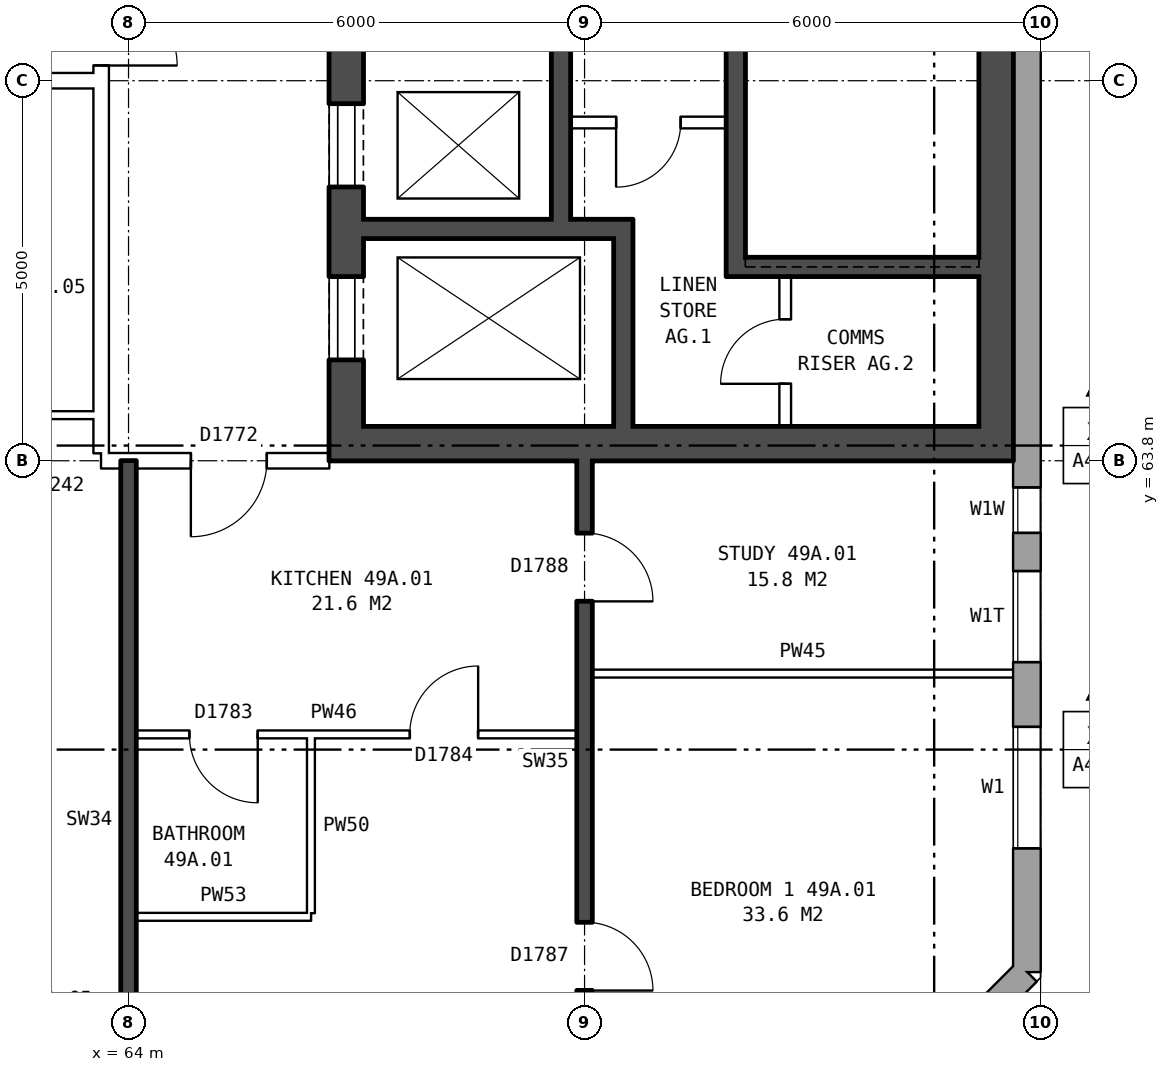
"""IFC4 building model, lengths in metres.
Left out: names, types, materials, properties, quantities, classifications, styles, units other than length and angle.
Written with IfcOpenShell. Run it as: python <this file> out.ifc"""

import sys

from ifc_helpers import new_model, si_unit, direction, frame, frame_2d, origin, place, context, subcontext, project, spatial, rectangle, extrude, element, fill, save


model = new_model("IFC4")
c1 = context("Model", 3, precision=1e-05, world=origin(), true_north=direction((0.0, 1.0)))
c2 = subcontext(c1, "Body", "Model", "MODEL_VIEW")
j1 = project(units=[si_unit("LENGTHUNIT", "METRE"), si_unit("PLANEANGLEUNIT", "RADIAN")], contexts=[c1])
p1 = place(None, origin())
s1 = spatial("IfcSite", under=j1, at=p1, CompositionType="ELEMENT")
p2 = place(p1, origin())
s2 = spatial("IfcBuilding", under=s1, at=p2, CompositionType="ELEMENT")
p3 = place(p2, frame((0.0, 0.0, 175.8)))
s3 = spatial("IfcBuildingStorey", under=s2, at=p3, CompositionType="ELEMENT", Elevation=175.8)
p4 = place(p3, frame((72.925, 54.18, 0.0), z_axis=(0.0, 0.0, 1.0), x_axis=(0.707106781187, 0.707106781187, 0.0)))
e1 = element("IfcWall", 1, at=p4, inside=s3, PredefinedType="STANDARD", context=c2, shape_type="SweptSolid", body=[
    extrude(rectangle(XDim=4.094, YDim=0.36, at=frame_2d((2.047, 0.0))), origin(), (0.0, 0.0, 1.0), 2.85),
])
p5 = place(p4, frame((1.247, 0.0, 0.8)))
e2 = element("IfcOpeningElement", 2, at=p5, cuts=e1, PredefinedType="OPENING", context=c2, shape_type="SweptSolid", body=[
    extrude(rectangle(XDim=1.6, YDim=1.8, at=frame_2d((0.8, 0.9))), frame((0.0, 0.19, 0.0), z_axis=(0.0, -1.0, 0.0), x_axis=(1.0, 0.0, 0.0)), (0.0, 0.0, 1.0), 0.38),
])
p6 = place(p3, frame((75.82, 57.075, 0.0), z_axis=(0.0, 0.0, 1.0), x_axis=(0.0, 1.0, 0.0)))
e3 = element("IfcWall", 3, at=p6, inside=s3, PredefinedType="STANDARD", context=c2, shape_type="SweptSolid", body=[
    extrude(rectangle(XDim=25.851, YDim=0.36, at=frame_2d((12.925, 0.0))), origin(), (0.0, 0.0, 1.0), 2.85),
])
p7 = place(p6, frame((1.625, 0.0, 0.8)))
e4 = element("IfcOpeningElement", 4, at=p7, cuts=e3, PredefinedType="OPENING", context=c2, shape_type="SweptSolid", body=[
    extrude(rectangle(XDim=1.6, YDim=1.8, at=frame_2d((0.8, 0.9))), frame((0.0, 0.19, 0.0), z_axis=(0.0, -1.0, 0.0), x_axis=(1.0, 0.0, 0.0)), (0.0, 0.0, 1.0), 0.38),
])
p8 = place(p6, frame((4.075, 0.0, 1.65)))
e5 = element("IfcOpeningElement", 5, at=p8, cuts=e3, PredefinedType="OPENING", context=c2, shape_type="SweptSolid", body=[
    extrude(rectangle(XDim=1.2, YDim=0.9, at=frame_2d((0.6, 0.45))), frame((0.0, 0.19, 0.0), z_axis=(0.0, -1.0, 0.0), x_axis=(1.0, 0.0, 0.0)), (0.0, 0.0, 1.0), 0.38),
])
p9 = place(p6, frame((19.45, 0.0, 0.35)))
e6 = element("IfcOpeningElement", 6, at=p9, cuts=e3, PredefinedType="OPENING", context=c2, shape_type="SweptSolid", body=[
    extrude(rectangle(XDim=0.8, YDim=0.9, at=frame_2d((0.4, 0.45))), frame((0.0, 0.19, 0.0), z_axis=(0.0, -1.0, 0.0), x_axis=(1.0, 0.0, 0.0)), (0.0, 0.0, 1.0), 0.38),
])
p10 = place(p6, frame((22.625, 0.0, 0.8)))
e7 = element("IfcOpeningElement", 7, at=p10, cuts=e3, PredefinedType="OPENING", context=c2, shape_type="SweptSolid", body=[
    extrude(rectangle(XDim=1.6, YDim=1.8, at=frame_2d((0.8, 0.9))), frame((0.0, 0.19, 0.0), z_axis=(0.0, -1.0, 0.0), x_axis=(1.0, 0.0, 0.0)), (0.0, 0.0, 1.0), 0.38),
])
p11 = place(p6, frame((5.775, 0.0, 0.45)))
e8 = element("IfcOpeningElement", 8, at=p11, cuts=e3, PredefinedType="OPENING", context=c2, shape_type="SweptSolid", body=[
    extrude(rectangle(XDim=0.6, YDim=0.9, at=frame_2d((0.3, 0.45))), frame((0.0, 0.19, 0.0), z_axis=(0.0, -1.0, 0.0), x_axis=(1.0, 0.0, 0.0)), (0.0, 0.0, 1.0), 0.38),
])
p12 = place(p6, frame((20.6, 0.0, 1.65)))
e9 = element("IfcOpeningElement", 9, at=p12, cuts=e3, PredefinedType="OPENING", context=c2, shape_type="SweptSolid", body=[
    extrude(rectangle(XDim=1.0, YDim=0.9, at=frame_2d((0.5, 0.45))), frame((0.0, 0.19, 0.0), z_axis=(0.0, -1.0, 0.0), x_axis=(1.0, 0.0, 0.0)), (0.0, 0.0, 1.0), 0.38),
])
p13 = place(p3, frame((66.865, 63.8, 0.0), z_axis=(0.0, 0.0, 1.0), x_axis=(0.0, 1.0, 0.0)))
e10 = element("IfcWall", 10, at=p13, inside=s3, PredefinedType="SHEAR", context=c2, shape_type="SweptSolid", body=[
    extrude(rectangle(XDim=12.4, YDim=0.45, at=frame_2d((6.2, 0.0))), origin(), (0.0, 0.0, 1.0), 2.85),
])
p14 = place(p13, frame((1.325, 0.0, 0.0)))
e11 = element("IfcOpeningElement", 11, at=p14, cuts=e10, PredefinedType="OPENING", context=c2, shape_type="SweptSolid", body=[
    extrude(rectangle(XDim=1.1, YDim=2.1, at=frame_2d((0.55, 1.05))), frame((0.0, 0.235, 0.0), z_axis=(0.0, -1.0, 0.0), x_axis=(1.0, 0.0, 0.0)), (0.0, 0.0, 1.0), 0.47),
])
p15 = place(p13, frame((3.6, 0.0, 0.0)))
e12 = element("IfcOpeningElement", 12, at=p15, cuts=e10, PredefinedType="OPENING", context=c2, shape_type="SweptSolid", body=[
    extrude(rectangle(XDim=1.1, YDim=2.1, at=frame_2d((0.55, 1.05))), frame((0.0, 0.235, 0.0), z_axis=(0.0, -1.0, 0.0), x_axis=(1.0, 0.0, 0.0)), (0.0, 0.0, 1.0), 0.47),
])
p16 = place(p13, frame((5.8, 0.0, 0.0)))
e13 = element("IfcOpeningElement", 13, at=p16, cuts=e10, PredefinedType="OPENING", context=c2, shape_type="SweptSolid", body=[
    extrude(rectangle(XDim=1.1, YDim=2.1, at=frame_2d((0.55, 1.05))), frame((0.0, 0.235, 0.0), z_axis=(0.0, -1.0, 0.0), x_axis=(1.0, 0.0, 0.0)), (0.0, 0.0, 1.0), 0.47),
])
p17 = place(p13, frame((8.0, 0.0, 0.0)))
e14 = element("IfcOpeningElement", 14, at=p17, cuts=e10, PredefinedType="OPENING", context=c2, shape_type="SweptSolid", body=[
    extrude(rectangle(XDim=1.1, YDim=2.1, at=frame_2d((0.55, 1.05))), frame((0.0, 0.235, 0.0), z_axis=(0.0, -1.0, 0.0), x_axis=(1.0, 0.0, 0.0)), (0.0, 0.0, 1.0), 0.47),
])
p18 = place(p13, frame((9.9, 0.0, 0.0)))
e15 = element("IfcOpeningElement", 15, at=p18, cuts=e10, PredefinedType="OPENING", context=c2, shape_type="SweptSolid", body=[
    extrude(rectangle(XDim=1.1, YDim=2.1, at=frame_2d((0.55, 1.05))), frame((0.0, 0.235, 0.0), z_axis=(0.0, -1.0, 0.0), x_axis=(1.0, 0.0, 0.0)), (0.0, 0.0, 1.0), 0.47),
])
p19 = place(p3, frame((75.415, 63.8, 0.0), z_axis=(0.0, 0.0, 1.0), x_axis=(0.0, 1.0, 0.0)))
e16 = element("IfcWall", 16, at=p19, inside=s3, PredefinedType="SHEAR", context=c2, shape_type="SweptSolid", body=[
    extrude(rectangle(XDim=12.4, YDim=0.45, at=frame_2d((6.2, 0.0))), origin(), (0.0, 0.0, 1.0), 2.85),
])
p20 = place(p3, frame((67.09, 64.025, 0.0), z_axis=(0.0, 0.0, 1.0), x_axis=(1.0, 0.0, 0.0)))
e17 = element("IfcWall", 17, at=p20, inside=s3, PredefinedType="SHEAR", context=c2, shape_type="SweptSolid", body=[
    extrude(rectangle(XDim=8.1, YDim=0.45, at=frame_2d((4.05, 0.0))), origin(), (0.0, 0.0, 1.0), 2.85),
])
p21 = place(p3, frame((72.115, 66.35, 0.0), z_axis=(0.0, 0.0, 1.0), x_axis=(1.0, 0.0, 0.0)))
e18 = element("IfcWall", 18, at=p21, inside=s3, PredefinedType="SHEAR", context=c2, shape_type="SweptSolid", body=[
    extrude(rectangle(XDim=3.075, YDim=0.25, at=frame_2d((1.538, 0.0))), origin(), (0.0, 0.0, 1.0), 2.85),
])
p22 = place(p3, frame((67.09, 66.85, 0.0), z_axis=(0.0, 0.0, 1.0), x_axis=(1.0, 0.0, 0.0)))
e19 = element("IfcWall", 19, at=p22, inside=s3, PredefinedType="SHEAR", context=c2, shape_type="SweptSolid", body=[
    extrude(rectangle(XDim=3.545, YDim=0.25, at=frame_2d((1.772, 0.0))), origin(), (0.0, 0.0, 1.0), 2.85),
])
p23 = place(p3, frame((69.815, 68.25, 0.0), z_axis=(0.0, 0.0, 1.0), x_axis=(1.0, 0.0, 0.0)))
e20 = element("IfcWall", 20, at=p23, inside=s3, PredefinedType="PARTITIONING", context=c2, shape_type="SweptSolid", body=[
    extrude(rectangle(XDim=2.05, YDim=0.15, at=frame_2d((1.025, 0.0))), origin(), (0.0, 0.0, 1.0), 2.85),
])
p24 = place(p23, frame((0.6, 0.0, 0.0)))
e21 = element("IfcOpeningElement", 21, at=p24, cuts=e20, PredefinedType="OPENING", context=c2, shape_type="SweptSolid", body=[
    extrude(rectangle(XDim=0.85, YDim=2.1, at=frame_2d((0.425, 1.05))), frame((0.0, 0.085, 0.0), z_axis=(0.0, -1.0, 0.0), x_axis=(1.0, 0.0, 0.0)), (0.0, 0.0, 1.0), 0.17),
])
p25 = place(p3, frame((69.69, 66.975, 0.0), z_axis=(0.0, 0.0, 1.0), x_axis=(0.0, 1.0, 0.0)))
e22 = element("IfcWall", 22, at=p25, inside=s3, PredefinedType="SHEAR", context=c2, shape_type="SweptSolid", body=[
    extrude(rectangle(XDim=6.6, YDim=0.25, at=frame_2d((3.3, 0.0))), origin(), (0.0, 0.0, 1.0), 2.85),
])
p26 = place(p3, frame((70.51, 64.25, 0.0), z_axis=(0.0, 0.0, 1.0), x_axis=(0.0, 1.0, 0.0)))
e23 = element("IfcWall", 23, at=p26, inside=s3, PredefinedType="SHEAR", context=c2, shape_type="SweptSolid", body=[
    extrude(rectangle(XDim=2.475, YDim=0.25, at=frame_2d((1.238, 0.0))), origin(), (0.0, 0.0, 1.0), 2.85),
])
p27 = place(p3, frame((71.99, 66.225, 0.0), z_axis=(0.0, 0.0, 1.0), x_axis=(0.0, 1.0, 0.0)))
e24 = element("IfcWall", 24, at=p27, inside=s3, PredefinedType="SHEAR", context=c2, shape_type="SweptSolid", body=[
    extrude(rectangle(XDim=7.35, YDim=0.25, at=frame_2d((3.675, 0.0))), origin(), (0.0, 0.0, 1.0), 2.85),
])
p28 = place(p3, frame((72.64, 64.25, 0.0), z_axis=(0.0, 0.0, 1.0), x_axis=(0.0, 1.0, 0.0)))
e25 = element("IfcWall", 25, at=p28, inside=s3, PredefinedType="PARTITIONING", context=c2, shape_type="SweptSolid", body=[
    extrude(rectangle(XDim=1.975, YDim=0.15, at=frame_2d((0.988, 0.0))), origin(), (0.0, 0.0, 1.0), 2.85),
])
p29 = place(p28, frame((0.562, 0.0, 0.0)))
e26 = element("IfcOpeningElement", 26, at=p29, cuts=e25, PredefinedType="OPENING", context=c2, shape_type="SweptSolid", body=[
    extrude(rectangle(XDim=0.85, YDim=2.1, at=frame_2d((0.425, 1.05))), frame((0.0, 0.085, 0.0), z_axis=(0.0, -1.0, 0.0), x_axis=(1.0, 0.0, 0.0)), (0.0, 0.0, 1.0), 0.17),
])
p30 = place(p3, frame((63.64, 63.9, 0.0), z_axis=(0.0, 0.0, 1.0), x_axis=(0.0, 1.0, 0.0)))
e27 = element("IfcWall", 27, at=p30, inside=s3, PredefinedType="PARTITIONING", context=c2, shape_type="SweptSolid", body=[
    extrude(rectangle(XDim=12.2, YDim=0.2, at=frame_2d((6.1, 0.0))), origin(), (0.0, 0.0, 1.0), 2.85),
])
p31 = place(p30, frame((5.1, 0.0, 0.0)))
e28 = element("IfcOpeningElement", 28, at=p31, cuts=e27, PredefinedType="OPENING", context=c2, shape_type="SweptSolid", body=[
    extrude(rectangle(XDim=2.0, YDim=2.1, at=frame_2d((1.0, 1.05))), frame((0.0, 0.11, 0.0), z_axis=(0.0, -1.0, 0.0), x_axis=(1.0, 0.0, 0.0)), (0.0, 0.0, 1.0), 0.22),
])
p32 = place(p3, frame((64.1, 57.8, 0.0), z_axis=(0.0, 0.0, 1.0), x_axis=(1.0, 0.0, 0.0)))
e29 = element("IfcWall", 29, at=p32, inside=s3, PredefinedType="PARTITIONING", context=c2, shape_type="SweptSolid", body=[
    extrude(rectangle(XDim=2.3, YDim=0.1, at=frame_2d((1.15, 0.0))), origin(), (0.0, 0.0, 1.0), 2.85),
])
p33 = place(p3, frame((64.1, 60.2, 0.0), z_axis=(0.0, 0.0, 1.0), x_axis=(1.0, 0.0, 0.0)))
e30 = element("IfcWall", 30, at=p33, inside=s3, PredefinedType="PARTITIONING", context=c2, shape_type="SweptSolid", body=[
    extrude(rectangle(XDim=5.8, YDim=0.1, at=frame_2d((2.9, 0.0))), origin(), (0.0, 0.0, 1.0), 2.85),
])
p34 = place(p33, frame((3.6, 0.0, 0.0)))
e31 = element("IfcOpeningElement", 31, at=p34, cuts=e30, PredefinedType="OPENING", context=c2, shape_type="SweptSolid", body=[
    extrude(rectangle(XDim=0.9, YDim=2.1, at=frame_2d((0.45, 1.05))), frame((0.0, 0.06, 0.0), z_axis=(0.0, -1.0, 0.0), x_axis=(1.0, 0.0, 0.0)), (0.0, 0.0, 1.0), 0.12),
])
p35 = place(p33, frame((0.7, 0.0, 0.0)))
e32 = element("IfcOpeningElement", 32, at=p35, cuts=e30, PredefinedType="OPENING", context=c2, shape_type="SweptSolid", body=[
    extrude(rectangle(XDim=0.9, YDim=2.1, at=frame_2d((0.45, 1.05))), frame((0.0, 0.06, 0.0), z_axis=(0.0, -1.0, 0.0), x_axis=(1.0, 0.0, 0.0)), (0.0, 0.0, 1.0), 0.12),
])
p36 = place(p3, frame((70.1, 61.0, 0.0), z_axis=(0.0, 0.0, 1.0), x_axis=(1.0, 0.0, 0.0)))
e33 = element("IfcWall", 33, at=p36, inside=s3, PredefinedType="PARTITIONING", context=c2, shape_type="SweptSolid", body=[
    extrude(rectangle(XDim=5.54, YDim=0.1, at=frame_2d((2.77, 0.0))), origin(), (0.0, 0.0, 1.0), 2.85),
])
p37 = place(p3, frame((63.64, 63.8, 0.0), z_axis=(0.0, 0.0, 1.0), x_axis=(1.0, 0.0, 0.0)))
e34 = element("IfcWall", 34, at=p37, inside=s3, PredefinedType="PARTITIONING", context=c2, shape_type="SweptSolid", body=[
    extrude(rectangle(XDim=3.0, YDim=0.2, at=frame_2d((1.5, 0.0))), origin(), (0.0, 0.0, 1.0), 2.85),
])
p38 = place(p37, frame((1.18, 0.0, 0.0)))
e35 = element("IfcOpeningElement", 35, at=p38, cuts=e34, PredefinedType="OPENING", context=c2, shape_type="SweptSolid", body=[
    extrude(rectangle(XDim=1.0, YDim=2.1, at=frame_2d((0.5, 1.05))), frame((0.0, 0.11, 0.0), z_axis=(0.0, -1.0, 0.0), x_axis=(1.0, 0.0, 0.0)), (0.0, 0.0, 1.0), 0.22),
])
p39 = place(p3, frame((61.0, 64.4, 0.0), z_axis=(0.0, 0.0, 1.0), x_axis=(1.0, 0.0, 0.0)))
e36 = element("IfcWall", 36, at=p39, inside=s3, PredefinedType="PARTITIONING", context=c2, shape_type="SweptSolid", body=[
    extrude(rectangle(XDim=2.64, YDim=0.1, at=frame_2d((1.32, 0.0))), origin(), (0.0, 0.0, 1.0), 2.85),
])
p40 = place(p3, frame((44.36, 68.8, 0.0), z_axis=(0.0, 0.0, 1.0), x_axis=(1.0, 0.0, 0.0)))
e37 = element("IfcWall", 37, at=p40, inside=s3, PredefinedType="PARTITIONING", context=c2, shape_type="SweptSolid", body=[
    extrude(rectangle(XDim=19.28, YDim=0.2, at=frame_2d((9.64, 0.0))), origin(), (0.0, 0.0, 1.0), 2.85),
])
p41 = place(p40, frame((14.64, 0.0, 0.0)))
e38 = element("IfcOpeningElement", 38, at=p41, cuts=e37, PredefinedType="OPENING", context=c2, shape_type="SweptSolid", body=[
    extrude(rectangle(XDim=1.0, YDim=2.1, at=frame_2d((0.5, 1.05))), frame((0.0, 0.11, 0.0), z_axis=(0.0, -1.0, 0.0), x_axis=(1.0, 0.0, 0.0)), (0.0, 0.0, 1.0), 0.22),
])
p42 = place(p40, frame((11.64, 0.0, 0.0)))
e39 = element("IfcOpeningElement", 39, at=p42, cuts=e37, PredefinedType="OPENING", context=c2, shape_type="SweptSolid", body=[
    extrude(rectangle(XDim=1.0, YDim=2.1, at=frame_2d((0.5, 1.05))), frame((0.0, 0.11, 0.0), z_axis=(0.0, -1.0, 0.0), x_axis=(1.0, 0.0, 0.0)), (0.0, 0.0, 1.0), 0.22),
])
p43 = place(p40, frame((5.64, 0.0, 0.0)))
e40 = element("IfcOpeningElement", 40, at=p43, cuts=e37, PredefinedType="OPENING", context=c2, shape_type="SweptSolid", body=[
    extrude(rectangle(XDim=1.0, YDim=2.1, at=frame_2d((0.5, 1.05))), frame((0.0, 0.11, 0.0), z_axis=(0.0, -1.0, 0.0), x_axis=(1.0, 0.0, 0.0)), (0.0, 0.0, 1.0), 0.22),
])
p44 = place(p3, frame((64.0, 54.36, 0.0), z_axis=(0.0, 0.0, 1.0), x_axis=(0.0, 1.0, 0.0)))
e41 = element("IfcWall", 41, at=p44, inside=s3, PredefinedType="SOLIDWALL", context=c2, shape_type="SweptSolid", body=[
    extrude(rectangle(XDim=9.44, YDim=0.2, at=frame_2d((4.72, 0.0))), origin(), (0.0, 0.0, 1.0), 2.85),
])
p45 = place(p3, frame((66.4, 57.85, 0.0), z_axis=(0.0, 0.0, 1.0), x_axis=(0.0, 1.0, 0.0)))
e42 = element("IfcWall", 42, at=p45, inside=s3, PredefinedType="PARTITIONING", context=c2, shape_type="SweptSolid", body=[
    extrude(rectangle(XDim=2.3, YDim=0.1, at=frame_2d((1.15, 0.0))), origin(), (0.0, 0.0, 1.0), 2.85),
])
p46 = place(p3, frame((70.0, 54.36, 0.0), z_axis=(0.0, 0.0, 1.0), x_axis=(0.0, 1.0, 0.0)))
e43 = element("IfcWall", 43, at=p46, inside=s3, PredefinedType="SOLIDWALL", context=c2, shape_type="SweptSolid", body=[
    extrude(rectangle(XDim=9.44, YDim=0.2, at=frame_2d((4.72, 0.0))), origin(), (0.0, 0.0, 1.0), 2.85),
])
p47 = place(p46, frame((2.47, 0.0, 0.0)))
e44 = element("IfcOpeningElement", 44, at=p47, cuts=e43, PredefinedType="OPENING", context=c2, shape_type="SweptSolid", body=[
    extrude(rectangle(XDim=0.9, YDim=2.1, at=frame_2d((0.45, 1.05))), frame((0.0, 0.11, 0.0), z_axis=(0.0, -1.0, 0.0), x_axis=(1.0, 0.0, 0.0)), (0.0, 0.0, 1.0), 0.22),
])
p48 = place(p46, frame((7.59, 0.0, 0.0)))
e45 = element("IfcOpeningElement", 45, at=p48, cuts=e43, PredefinedType="OPENING", context=c2, shape_type="SweptSolid", body=[
    extrude(rectangle(XDim=0.9, YDim=2.1, at=frame_2d((0.45, 1.05))), frame((0.0, 0.11, 0.0), z_axis=(0.0, -1.0, 0.0), x_axis=(1.0, 0.0, 0.0)), (0.0, 0.0, 1.0), 0.22),
])
p49 = place(p7, origin())
e46 = element("IfcWindow", 46, at=p49, inside=s3, PartitioningType="SINGLE_PANEL", PredefinedType="WINDOW", context=c2, shape_type="SweptSolid", body=[
    extrude(rectangle(XDim=1.6, YDim=1.8, at=frame_2d((0.8, 0.9))), frame((0.0, 0.15, 0.0), z_axis=(0.0, -1.0, 0.0), x_axis=(1.0, 0.0, 0.0)), (0.0, 0.0, 1.0), 0.06),
])
fill(e4, e46)
p50 = place(p8, origin())
e47 = element("IfcWindow", 47, at=p50, inside=s3, PartitioningType="SINGLE_PANEL", PredefinedType="WINDOW", context=c2, shape_type="SweptSolid", body=[
    extrude(rectangle(XDim=1.2, YDim=0.9, at=frame_2d((0.6, 0.45))), frame((0.0, 0.15, 0.0), z_axis=(0.0, -1.0, 0.0), x_axis=(1.0, 0.0, 0.0)), (0.0, 0.0, 1.0), 0.06),
])
fill(e5, e47)
p51 = place(p14, origin())
e48 = element("IfcDoor", 48, at=p51, inside=s3, OperationType="DOUBLE_DOOR_SLIDING", PredefinedType="DOOR", context=c2, shape_type="SweptSolid", body=[
    extrude(rectangle(XDim=1.1, YDim=2.1, at=frame_2d((0.55, 1.05))), frame((0.0, -0.16, 0.0), z_axis=(0.0, -1.0, 0.0), x_axis=(1.0, 0.0, 0.0)), (0.0, 0.0, 1.0), 0.05),
])
fill(e11, e48)
p52 = place(p15, origin())
e49 = element("IfcDoor", 49, at=p52, inside=s3, OperationType="DOUBLE_DOOR_SLIDING", PredefinedType="DOOR", context=c2, shape_type="SweptSolid", body=[
    extrude(rectangle(XDim=1.1, YDim=2.1, at=frame_2d((0.55, 1.05))), frame((0.0, -0.16, 0.0), z_axis=(0.0, -1.0, 0.0), x_axis=(1.0, 0.0, 0.0)), (0.0, 0.0, 1.0), 0.05),
])
fill(e12, e49)
p53 = place(p24, frame((0.85, 0.0, 0.0), z_axis=(0.0, 0.0, 1.0), x_axis=(-1.0, 0.0, 0.0)))
e50 = element("IfcDoor", 50, at=p53, inside=s3, OperationType="SINGLE_SWING_RIGHT", PredefinedType="DOOR", context=c2, shape_type="SweptSolid", body=[
    extrude(rectangle(XDim=0.85, YDim=2.1, at=frame_2d((0.425, 1.05))), frame((0.0, 0.025, 0.0), z_axis=(0.0, -1.0, 0.0), x_axis=(1.0, 0.0, 0.0)), (0.0, 0.0, 1.0), 0.05),
])
fill(e21, e50)
p54 = place(p29, origin())
e51 = element("IfcDoor", 51, at=p54, inside=s3, OperationType="SINGLE_SWING_LEFT", PredefinedType="DOOR", context=c2, shape_type="SweptSolid", body=[
    extrude(rectangle(XDim=0.85, YDim=2.1, at=frame_2d((0.425, 1.05))), frame((0.0, 0.025, 0.0), z_axis=(0.0, -1.0, 0.0), x_axis=(1.0, 0.0, 0.0)), (0.0, 0.0, 1.0), 0.05),
])
fill(e26, e51)
p55 = place(p31, frame((2.0, 0.0, 0.0), z_axis=(0.0, 0.0, 1.0), x_axis=(-1.0, 0.0, 0.0)))
e52 = element("IfcDoor", 52, at=p55, inside=s3, OperationType="DOUBLE_DOOR_SINGLE_SWING", PredefinedType="DOOR", context=c2, shape_type="SweptSolid", body=[
    extrude(rectangle(XDim=2.0, YDim=2.1, at=frame_2d((1.0, 1.05))), frame((0.0, 0.025, 0.0), z_axis=(0.0, -1.0, 0.0), x_axis=(1.0, 0.0, 0.0)), (0.0, 0.0, 1.0), 0.05),
])
fill(e28, e52)
p56 = place(p47, frame((0.9, 0.0, 0.0), z_axis=(0.0, 0.0, 1.0), x_axis=(-1.0, 0.0, 0.0)))
e53 = element("IfcDoor", 53, at=p56, inside=s3, OperationType="SINGLE_SWING_RIGHT", PredefinedType="DOOR", context=c2, shape_type="SweptSolid", body=[
    extrude(rectangle(XDim=0.9, YDim=2.1, at=frame_2d((0.45, 1.05))), frame((0.0, 0.025, 0.0), z_axis=(0.0, -1.0, 0.0), x_axis=(1.0, 0.0, 0.0)), (0.0, 0.0, 1.0), 0.05),
])
fill(e44, e53)
p57 = place(p48, frame((0.9, 0.0, 0.0), z_axis=(0.0, 0.0, 1.0), x_axis=(-1.0, 0.0, 0.0)))
e54 = element("IfcDoor", 54, at=p57, inside=s3, OperationType="SINGLE_SWING_RIGHT", PredefinedType="DOOR", context=c2, shape_type="SweptSolid", body=[
    extrude(rectangle(XDim=0.9, YDim=2.1, at=frame_2d((0.45, 1.05))), frame((0.0, 0.025, 0.0), z_axis=(0.0, -1.0, 0.0), x_axis=(1.0, 0.0, 0.0)), (0.0, 0.0, 1.0), 0.05),
])
fill(e45, e54)
p58 = place(p38, frame((1.0, 0.0, 0.0), z_axis=(0.0, 0.0, 1.0), x_axis=(-1.0, 0.0, 0.0)))
e55 = element("IfcDoor", 55, at=p58, inside=s3, OperationType="SINGLE_SWING_RIGHT", PredefinedType="DOOR", context=c2, shape_type="SweptSolid", body=[
    extrude(rectangle(XDim=1.0, YDim=2.1, at=frame_2d((0.5, 1.05))), frame((0.0, 0.025, 0.0), z_axis=(0.0, -1.0, 0.0), x_axis=(1.0, 0.0, 0.0)), (0.0, 0.0, 1.0), 0.05),
])
fill(e35, e55)
p59 = place(p34, origin())
e56 = element("IfcDoor", 56, at=p59, inside=s3, OperationType="SINGLE_SWING_RIGHT", PredefinedType="DOOR", context=c2, shape_type="SweptSolid", body=[
    extrude(rectangle(XDim=0.9, YDim=2.1, at=frame_2d((0.45, 1.05))), frame((0.0, 0.025, 0.0), z_axis=(0.0, -1.0, 0.0), x_axis=(1.0, 0.0, 0.0)), (0.0, 0.0, 1.0), 0.05),
])
fill(e31, e56)
p60 = place(p35, frame((0.9, 0.0, 0.0), z_axis=(0.0, 0.0, 1.0), x_axis=(-1.0, 0.0, 0.0)))
e57 = element("IfcDoor", 57, at=p60, inside=s3, OperationType="SINGLE_SWING_LEFT", PredefinedType="DOOR", context=c2, shape_type="SweptSolid", body=[
    extrude(rectangle(XDim=0.9, YDim=2.1, at=frame_2d((0.45, 1.05))), frame((0.0, 0.025, 0.0), z_axis=(0.0, -1.0, 0.0), x_axis=(1.0, 0.0, 0.0)), (0.0, 0.0, 1.0), 0.05),
])
fill(e32, e57)
p61 = place(p11, origin())
e58 = element("IfcWindow", 58, at=p61, inside=s3, PartitioningType="SINGLE_PANEL", PredefinedType="WINDOW", context=c2, shape_type="SweptSolid", body=[
    extrude(rectangle(XDim=0.6, YDim=0.9, at=frame_2d((0.3, 0.45))), frame((0.0, 0.15, 0.0), z_axis=(0.0, -1.0, 0.0), x_axis=(1.0, 0.0, 0.0)), (0.0, 0.0, 1.0), 0.06),
])
fill(e8, e58)
save(model, sys.argv[1])
